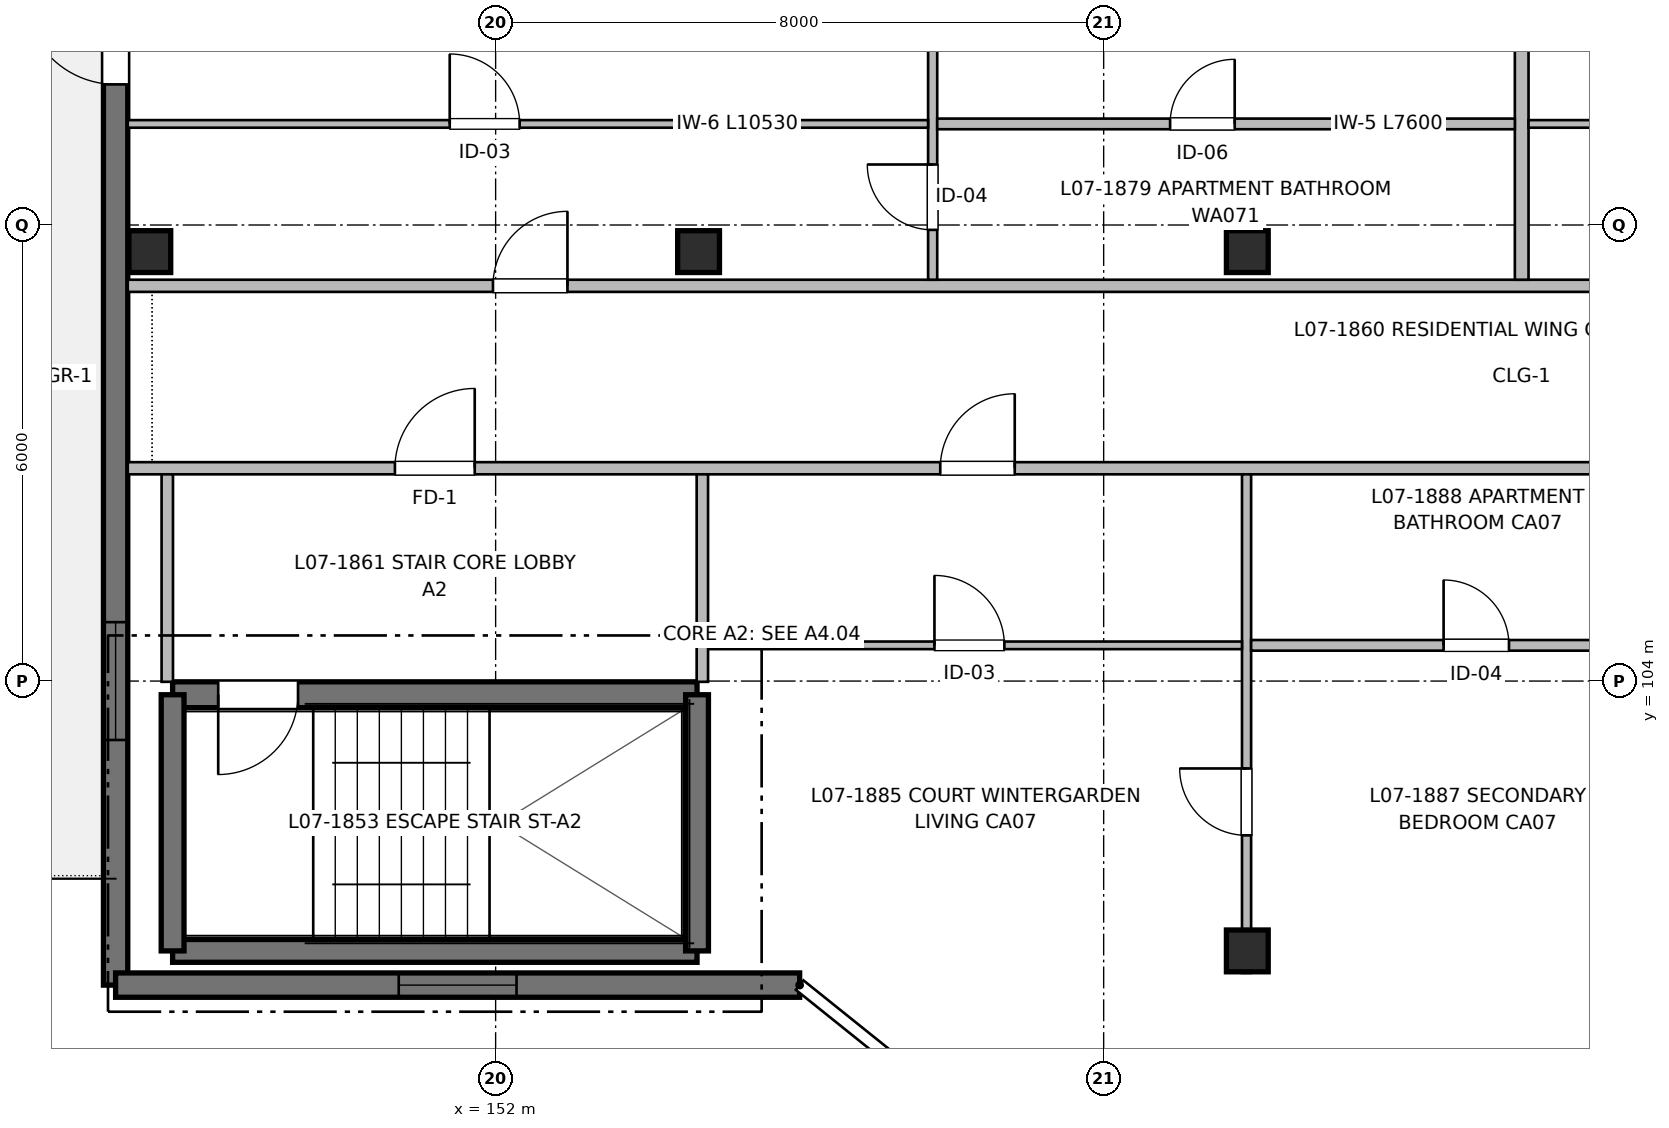
"""IFC4 building model, lengths in metres.
Left out: names, types, materials, properties, quantities, classifications, styles, units other than length and angle.
Written with IfcOpenShell. Run it as: python <this file> out.ifc"""

import sys

from ifc_helpers import new_model, si_unit, direction, frame, frame_2d, origin, origin_2d, place, context, subcontext, project, spatial, rectangle, extrude, element, fill, save


model = new_model("IFC4")
c1 = context("Model", 3, precision=1e-05, world=origin(), true_north=direction((0.0, 1.0)))
c2 = subcontext(c1, "Body", "Model", "MODEL_VIEW")
j1 = project(units=[si_unit("LENGTHUNIT", "METRE"), si_unit("PLANEANGLEUNIT", "RADIAN")], contexts=[c1])
p1 = place(None, origin())
s1 = spatial("IfcSite", under=j1, at=p1, CompositionType="ELEMENT")
p2 = place(p1, origin())
s2 = spatial("IfcBuilding", under=s1, at=p2, CompositionType="ELEMENT")
p3 = place(p2, frame((0.0, 0.0, 23.36)))
s3 = spatial("IfcBuildingStorey", under=s2, at=p3, CompositionType="ELEMENT", Elevation=23.36)
for number, where, z_axis, x_axis in (
    (1, (147.45, 109.65, 0.0), (0.0, 0.0, 1.0), (1.0, 0.0, 0.0)),
    (2, (154.67, 109.65, 0.0), (0.0, 0.0, 1.0), (1.0, 0.0, 0.0)),
    (3, (161.89, 100.45, 0.0), (0.0, 0.0, 1.0), (1.0, 0.0, 0.0)),
    (4, (161.89, 109.65, 0.0), (0.0, 0.0, 1.0), (1.0, 0.0, 0.0)),
):
    element("IfcColumn", number, at=place(p3, frame(where, z_axis=z_axis, x_axis=x_axis)), inside=s3, PredefinedType="COLUMN", context=c2, shape_type="SweptSolid", body=[
        extrude(rectangle(XDim=0.55, YDim=0.55, at=origin_2d()), origin(), (0.0, 0.0, 1.0), 3.2),
    ])
p4 = place(p3, frame((147.75, 100.45, 0.0), z_axis=(0.0, 0.0, 1.0), x_axis=(1.0, 0.0, 0.0)))
e5 = element("IfcWall", 5, at=p4, inside=s3, PredefinedType="SHEAR", context=c2, shape_type="SweptSolid", body=[
    extrude(rectangle(XDim=6.9, YDim=0.3, at=frame_2d((3.45, 0.0))), origin(), (0.0, 0.0, 1.0), 3.2),
])
p5 = place(p3, frame((154.65, 103.82, 0.0), z_axis=(0.0, 0.0, 1.0), x_axis=(-1.0, 0.0, 0.0)))
e6 = element("IfcWall", 6, at=p5, inside=s3, PredefinedType="SHEAR", context=c2, shape_type="SweptSolid", body=[
    extrude(rectangle(XDim=6.9, YDim=0.34, at=frame_2d((3.45, 0.0))), origin(), (0.0, 0.0, 1.0), 3.2),
])
p6 = place(p5, frame((5.25, 0.0, 0.0)))
e7 = element("IfcOpeningElement", 7, at=p6, cuts=e6, PredefinedType="OPENING", context=c2, shape_type="SweptSolid", body=[
    extrude(rectangle(XDim=1.05, YDim=2.15, at=frame_2d((0.525, 1.075))), frame((0.0, 0.18, 0.0), z_axis=(0.0, -1.0, 0.0), x_axis=(1.0, 0.0, 0.0)), (0.0, 0.0, 1.0), 0.36),
])
for number, where, z_axis, x_axis in (
    (8, (147.75, 103.82, 0.0), (0.0, 0.0, 1.0), (0.0, -1.0, 0.0)),
    (9, (154.65, 100.45, 0.0), (0.0, 0.0, 1.0), (0.0, 1.0, 0.0)),
):
    element("IfcWall", number, at=place(p3, frame(where, z_axis=z_axis, x_axis=x_axis)), inside=s3, PredefinedType="SHEAR", context=c2, shape_type="SweptSolid", body=[
        extrude(rectangle(XDim=3.37, YDim=0.3, at=frame_2d((1.685, 0.0))), origin(), (0.0, 0.0, 1.0), 3.2),
    ])
p7 = place(p3, frame((147.0, 100.0, 0.0), z_axis=(0.0, 0.0, 1.0), x_axis=(0.0, 1.0, 0.0)))
e10 = element("IfcWall", 10, at=p7, inside=s3, PredefinedType="SHEAR", context=c2, shape_type="SweptSolid", body=[
    extrude(rectangle(XDim=16.0, YDim=0.32, at=frame_2d((8.0, 0.0))), origin(), (0.0, 0.0, 1.0), 2.98),
])
p8 = place(p7, frame((3.225, 0.0, 0.82)))
e11 = element("IfcOpeningElement", 11, at=p8, cuts=e10, PredefinedType="OPENING", context=c2, shape_type="SweptSolid", body=[
    extrude(rectangle(XDim=1.55, YDim=1.4, at=frame_2d((0.775, 0.7))), frame((0.0, 0.17, 0.0), z_axis=(0.0, -1.0, 0.0), x_axis=(1.0, 0.0, 0.0)), (0.0, 0.0, 1.0), 0.34),
])
p9 = place(p7, frame((11.85, 0.0, 0.0)))
e12 = element("IfcOpeningElement", 12, at=p9, cuts=e10, PredefinedType="OPENING", context=c2, shape_type="SweptSolid", body=[
    extrude(rectangle(XDim=1.2, YDim=2.2, at=frame_2d((0.6, 1.1))), frame((0.0, 0.17, 0.0), z_axis=(0.0, -1.0, 0.0), x_axis=(1.0, 0.0, 0.0)), (0.0, 0.0, 1.0), 0.34),
])
p10 = place(p3, frame((156.0, 100.0, 0.0), z_axis=(0.0, 0.0, 1.0), x_axis=(-1.0, 0.0, 0.0)))
e13 = element("IfcWall", 13, at=p10, inside=s3, PredefinedType="SHEAR", context=c2, shape_type="SweptSolid", body=[
    extrude(rectangle(XDim=9.0, YDim=0.32, at=frame_2d((4.5, 0.0))), origin(), (0.0, 0.0, 1.0), 2.98),
])
p11 = place(p10, frame((3.725, 0.0, 0.82)))
e14 = element("IfcOpeningElement", 14, at=p11, cuts=e13, PredefinedType="OPENING", context=c2, shape_type="SweptSolid", body=[
    extrude(rectangle(XDim=1.55, YDim=1.4, at=frame_2d((0.775, 0.7))), frame((0.0, 0.17, 0.0), z_axis=(0.0, -1.0, 0.0), x_axis=(1.0, 0.0, 0.0)), (0.0, 0.0, 1.0), 0.34),
])
p12 = place(p3, frame((147.16, 106.8, 0.0), z_axis=(0.0, 0.0, 1.0), x_axis=(1.0, 0.0, 0.0)))
e15 = element("IfcWall", 15, at=p12, inside=s3, PredefinedType="PARTITIONING", context=c2, shape_type="SweptSolid", body=[
    extrude(rectangle(XDim=27.64, YDim=0.16, at=frame_2d((13.82, 0.0))), origin(), (0.0, 0.0, 1.0), 2.935),
])
p13 = place(p12, frame((3.515, 0.0, 0.0)))
e16 = element("IfcOpeningElement", 16, at=p13, cuts=e15, PredefinedType="OPENING", context=c2, shape_type="SweptSolid", body=[
    extrude(rectangle(XDim=1.05, YDim=2.15, at=frame_2d((0.525, 1.075))), frame((0.0, 0.09, 0.0), z_axis=(0.0, -1.0, 0.0), x_axis=(1.0, 0.0, 0.0)), (0.0, 0.0, 1.0), 0.18),
])
p14 = place(p12, frame((10.69, 0.0, 0.0)))
e17 = element("IfcOpeningElement", 17, at=p14, cuts=e15, PredefinedType="OPENING", context=c2, shape_type="SweptSolid", body=[
    extrude(rectangle(XDim=0.98, YDim=2.15, at=frame_2d((0.49, 1.075))), frame((0.0, 0.09, 0.0), z_axis=(0.0, -1.0, 0.0), x_axis=(1.0, 0.0, 0.0)), (0.0, 0.0, 1.0), 0.18),
])
p15 = place(p3, frame((147.16, 109.2, 0.0), z_axis=(0.0, 0.0, 1.0), x_axis=(1.0, 0.0, 0.0)))
e18 = element("IfcWall", 18, at=p15, inside=s3, PredefinedType="PARTITIONING", context=c2, shape_type="SweptSolid", body=[
    extrude(rectangle(XDim=36.68, YDim=0.16, at=frame_2d((18.34, 0.0))), origin(), (0.0, 0.0, 1.0), 2.935),
])
p16 = place(p15, frame((4.805, 0.0, 0.0)))
e19 = element("IfcOpeningElement", 19, at=p16, cuts=e18, PredefinedType="OPENING", context=c2, shape_type="SweptSolid", body=[
    extrude(rectangle(XDim=0.98, YDim=2.15, at=frame_2d((0.49, 1.075))), frame((0.0, 0.09, 0.0), z_axis=(0.0, -1.0, 0.0), x_axis=(1.0, 0.0, 0.0)), (0.0, 0.0, 1.0), 0.18),
])
p17 = place(p15, frame((23.235, 0.0, 0.0)))
e20 = element("IfcOpeningElement", 20, at=p17, cuts=e18, PredefinedType="OPENING", context=c2, shape_type="SweptSolid", body=[
    extrude(rectangle(XDim=0.98, YDim=2.15, at=frame_2d((0.49, 1.075))), frame((0.0, 0.09, 0.0), z_axis=(0.0, -1.0, 0.0), x_axis=(1.0, 0.0, 0.0)), (0.0, 0.0, 1.0), 0.18),
])
for number, where, z_axis, x_axis in (
    (21, (147.68, 103.99, 0.0), (0.0, 0.0, 1.0), (0.0, 1.0, 0.0)),
    (22, (154.72, 103.99, 0.0), (0.0, 0.0, 1.0), (0.0, 1.0, 0.0)),
):
    element("IfcWall", number, at=place(p3, frame(where, z_axis=z_axis, x_axis=x_axis)), inside=s3, PredefinedType="PARTITIONING", context=c2, shape_type="SweptSolid", body=[
        extrude(rectangle(XDim=2.73, YDim=0.15, at=frame_2d((1.365, 0.0))), origin(), (0.0, 0.0, 1.0), 2.935),
    ])
p18 = place(p3, frame((165.5, 109.28, 0.0), z_axis=(0.0, 0.0, 1.0), x_axis=(0.0, 1.0, 0.0)))
e23 = element("IfcWall", 23, at=p18, inside=s3, PredefinedType="PARTITIONING", context=c2, shape_type="SweptSolid", body=[
    extrude(rectangle(XDim=6.59, YDim=0.18, at=frame_2d((3.295, 0.0))), origin(), (0.0, 0.0, 1.0), 2.935),
])
p19 = place(p3, frame((157.75, 109.28, 0.0), z_axis=(0.0, 0.0, 1.0), x_axis=(0.0, 1.0, 0.0)))
e24 = element("IfcWall", 24, at=p19, inside=s3, PredefinedType="PARTITIONING", context=c2, shape_type="SweptSolid", body=[
    extrude(rectangle(XDim=6.59, YDim=0.12, at=frame_2d((3.295, 0.0))), origin(), (0.0, 0.0, 1.0), 2.935),
])
p20 = place(p19, frame((0.656, 0.0, 0.0)))
e25 = element("IfcOpeningElement", 25, at=p20, cuts=e24, PredefinedType="OPENING", context=c2, shape_type="SweptSolid", body=[
    extrude(rectangle(XDim=0.86, YDim=2.1, at=frame_2d((0.43, 1.05))), frame((0.0, 0.07, 0.0), z_axis=(0.0, -1.0, 0.0), x_axis=(1.0, 0.0, 0.0)), (0.0, 0.0, 1.0), 0.14),
])
p21 = place(p19, frame((4.093, 0.0, 0.0)))
e26 = element("IfcOpeningElement", 26, at=p21, cuts=e24, PredefinedType="OPENING", context=c2, shape_type="SweptSolid", body=[
    extrude(rectangle(XDim=0.9, YDim=2.1, at=frame_2d((0.45, 1.05))), frame((0.0, 0.07, 0.0), z_axis=(0.0, -1.0, 0.0), x_axis=(1.0, 0.0, 0.0)), (0.0, 0.0, 1.0), 0.14),
])
p22 = place(p3, frame((157.81, 111.33, 0.0), z_axis=(0.0, 0.0, 1.0), x_axis=(1.0, 0.0, 0.0)))
e27 = element("IfcWall", 27, at=p22, inside=s3, PredefinedType="PARTITIONING", context=c2, shape_type="SweptSolid", body=[
    extrude(rectangle(XDim=7.6, YDim=0.14, at=frame_2d((3.8, 0.0))), origin(), (0.0, 0.0, 1.0), 2.935),
])
p23 = place(p22, frame((3.064, 0.0, 0.0)))
e28 = element("IfcOpeningElement", 28, at=p23, cuts=e27, PredefinedType="OPENING", context=c2, shape_type="SweptSolid", body=[
    extrude(rectangle(XDim=0.85, YDim=2.05, at=frame_2d((0.425, 1.025))), frame((0.0, 0.08, 0.0), z_axis=(0.0, -1.0, 0.0), x_axis=(1.0, 0.0, 0.0)), (0.0, 0.0, 1.0), 0.16),
])
p24 = place(p3, frame((147.16, 111.33, 0.0), z_axis=(0.0, 0.0, 1.0), x_axis=(1.0, 0.0, 0.0)))
e29 = element("IfcWall", 29, at=p24, inside=s3, PredefinedType="PARTITIONING", context=c2, shape_type="SweptSolid", body=[
    extrude(rectangle(XDim=10.53, YDim=0.1, at=frame_2d((5.265, 0.0))), origin(), (0.0, 0.0, 1.0), 2.935),
])
p25 = place(p24, frame((4.236, 0.0, 0.0)))
e30 = element("IfcOpeningElement", 30, at=p25, cuts=e29, PredefinedType="OPENING", context=c2, shape_type="SweptSolid", body=[
    extrude(rectangle(XDim=0.92, YDim=2.1, at=frame_2d((0.46, 1.05))), frame((0.0, 0.06, 0.0), z_axis=(0.0, -1.0, 0.0), x_axis=(1.0, 0.0, 0.0)), (0.0, 0.0, 1.0), 0.12),
])
p26 = place(p3, frame((165.59, 111.33, 0.0), z_axis=(0.0, 0.0, 1.0), x_axis=(1.0, 0.0, 0.0)))
e31 = element("IfcWall", 31, at=p26, inside=s3, PredefinedType="PARTITIONING", context=c2, shape_type="SweptSolid", body=[
    extrude(rectangle(XDim=10.53, YDim=0.1, at=frame_2d((5.265, 0.0))), origin(), (0.0, 0.0, 1.0), 2.935),
])
p27 = place(p26, frame((4.236, 0.0, 0.0)))
e32 = element("IfcOpeningElement", 32, at=p27, cuts=e31, PredefinedType="OPENING", context=c2, shape_type="SweptSolid", body=[
    extrude(rectangle(XDim=0.92, YDim=2.1, at=frame_2d((0.46, 1.05))), frame((0.0, 0.06, 0.0), z_axis=(0.0, -1.0, 0.0), x_axis=(1.0, 0.0, 0.0)), (0.0, 0.0, 1.0), 0.12),
])
p28 = place(p3, frame((161.88, 100.16, 0.0), z_axis=(0.0, 0.0, 1.0), x_axis=(0.0, 1.0, 0.0)))
e33 = element("IfcWall", 33, at=p28, inside=s3, PredefinedType="PARTITIONING", context=c2, shape_type="SweptSolid", body=[
    extrude(rectangle(XDim=6.56, YDim=0.12, at=frame_2d((3.28, 0.0))), origin(), (0.0, 0.0, 1.0), 2.68),
])
p29 = place(p28, frame((1.81, 0.0, 0.0)))
e34 = element("IfcOpeningElement", 34, at=p29, cuts=e33, PredefinedType="OPENING", context=c2, shape_type="SweptSolid", body=[
    extrude(rectangle(XDim=0.88, YDim=2.1, at=frame_2d((0.44, 1.05))), frame((0.0, 0.07, 0.0), z_axis=(0.0, -1.0, 0.0), x_axis=(1.0, 0.0, 0.0)), (0.0, 0.0, 1.0), 0.14),
])
p30 = place(p3, frame((161.94, 104.47, 0.0), z_axis=(0.0, 0.0, 1.0), x_axis=(1.0, 0.0, 0.0)))
e35 = element("IfcWall", 35, at=p30, inside=s3, PredefinedType="PARTITIONING", context=c2, shape_type="SweptSolid", body=[
    extrude(rectangle(XDim=5.97, YDim=0.14, at=frame_2d((2.985, 0.0))), origin(), (0.0, 0.0, 1.0), 2.935),
])
p31 = place(p30, frame((2.533, 0.0, 0.0)))
e36 = element("IfcOpeningElement", 36, at=p31, cuts=e35, PredefinedType="OPENING", context=c2, shape_type="SweptSolid", body=[
    extrude(rectangle(XDim=0.86, YDim=2.1, at=frame_2d((0.43, 1.05))), frame((0.0, 0.08, 0.0), z_axis=(0.0, -1.0, 0.0), x_axis=(1.0, 0.0, 0.0)), (0.0, 0.0, 1.0), 0.16),
])
p32 = place(p3, frame((154.8, 104.47, 0.0), z_axis=(0.0, 0.0, 1.0), x_axis=(1.0, 0.0, 0.0)))
e37 = element("IfcWall", 37, at=p32, inside=s3, PredefinedType="PARTITIONING", context=c2, shape_type="SweptSolid", body=[
    extrude(rectangle(XDim=7.02, YDim=0.1, at=frame_2d((3.51, 0.0))), origin(), (0.0, 0.0, 1.0), 2.935),
])
p33 = place(p32, frame((2.974, 0.0, 0.0)))
e38 = element("IfcOpeningElement", 38, at=p33, cuts=e37, PredefinedType="OPENING", context=c2, shape_type="SweptSolid", body=[
    extrude(rectangle(XDim=0.92, YDim=2.1, at=frame_2d((0.46, 1.05))), frame((0.0, 0.06, 0.0), z_axis=(0.0, -1.0, 0.0), x_axis=(1.0, 0.0, 0.0)), (0.0, 0.0, 1.0), 0.12),
])
p34 = place(p6, origin())
e39 = element("IfcDoor", 39, at=p34, inside=s3, OperationType="SINGLE_SWING_RIGHT", PredefinedType="DOOR", context=c2, shape_type="SweptSolid", body=[
    extrude(rectangle(XDim=1.05, YDim=2.15, at=frame_2d((0.525, 1.075))), frame((0.0, 0.025, 0.0), z_axis=(0.0, -1.0, 0.0), x_axis=(1.0, 0.0, 0.0)), (0.0, 0.0, 1.0), 0.05),
])
fill(e7, e39)
p35 = place(p8, origin())
e40 = element("IfcWindow", 40, at=p35, inside=s3, PartitioningType="SINGLE_PANEL", PredefinedType="WINDOW", context=c2, shape_type="SweptSolid", body=[
    extrude(rectangle(XDim=1.55, YDim=1.4, at=frame_2d((0.775, 0.7))), frame((0.0, 0.03, 0.0), z_axis=(0.0, -1.0, 0.0), x_axis=(1.0, 0.0, 0.0)), (0.0, 0.0, 1.0), 0.06),
])
fill(e11, e40)
p36 = place(p9, origin())
e41 = element("IfcDoor", 41, at=p36, inside=s3, OperationType="SINGLE_SWING_RIGHT", PredefinedType="DOOR", context=c2, shape_type="SweptSolid", body=[
    extrude(rectangle(XDim=1.2, YDim=2.2, at=frame_2d((0.6, 1.1))), frame((0.0, 0.025, 0.0), z_axis=(0.0, -1.0, 0.0), x_axis=(1.0, 0.0, 0.0)), (0.0, 0.0, 1.0), 0.05),
])
fill(e12, e41)
p37 = place(p11, origin())
e42 = element("IfcWindow", 42, at=p37, inside=s3, PartitioningType="SINGLE_PANEL", PredefinedType="WINDOW", context=c2, shape_type="SweptSolid", body=[
    extrude(rectangle(XDim=1.55, YDim=1.4, at=frame_2d((0.775, 0.7))), frame((0.0, 0.03, 0.0), z_axis=(0.0, -1.0, 0.0), x_axis=(1.0, 0.0, 0.0)), (0.0, 0.0, 1.0), 0.06),
])
fill(e14, e42)
p38 = place(p13, origin())
e43 = element("IfcDoor", 43, at=p38, inside=s3, OperationType="SINGLE_SWING_RIGHT", PredefinedType="DOOR", context=c2, shape_type="SweptSolid", body=[
    extrude(rectangle(XDim=1.05, YDim=2.15, at=frame_2d((0.525, 1.075))), frame((0.0, 0.025, 0.0), z_axis=(0.0, -1.0, 0.0), x_axis=(1.0, 0.0, 0.0)), (0.0, 0.0, 1.0), 0.05),
])
fill(e16, e43)
p39 = place(p16, origin())
e44 = element("IfcDoor", 44, at=p39, inside=s3, OperationType="SINGLE_SWING_RIGHT", PredefinedType="DOOR", context=c2, shape_type="SweptSolid", body=[
    extrude(rectangle(XDim=0.98, YDim=2.15, at=frame_2d((0.49, 1.075))), frame((0.0, 0.025, 0.0), z_axis=(0.0, -1.0, 0.0), x_axis=(1.0, 0.0, 0.0)), (0.0, 0.0, 1.0), 0.05),
])
fill(e19, e44)
p40 = place(p25, origin())
e45 = element("IfcDoor", 45, at=p40, inside=s3, OperationType="SINGLE_SWING_LEFT", PredefinedType="DOOR", context=c2, shape_type="SweptSolid", body=[
    extrude(rectangle(XDim=0.92, YDim=2.1, at=frame_2d((0.46, 1.05))), frame((0.0, 0.025, 0.0), z_axis=(0.0, -1.0, 0.0), x_axis=(1.0, 0.0, 0.0)), (0.0, 0.0, 1.0), 0.05),
])
fill(e30, e45)
p41 = place(p20, origin())
e46 = element("IfcDoor", 46, at=p41, inside=s3, OperationType="SINGLE_SWING_RIGHT", PredefinedType="DOOR", context=c2, shape_type="SweptSolid", body=[
    extrude(rectangle(XDim=0.86, YDim=2.1, at=frame_2d((0.43, 1.05))), frame((0.0, 0.025, 0.0), z_axis=(0.0, -1.0, 0.0), x_axis=(1.0, 0.0, 0.0)), (0.0, 0.0, 1.0), 0.05),
])
fill(e25, e46)
p42 = place(p23, origin())
e47 = element("IfcDoor", 47, at=p42, inside=s3, OperationType="SINGLE_SWING_RIGHT", PredefinedType="DOOR", context=c2, shape_type="SweptSolid", body=[
    extrude(rectangle(XDim=0.85, YDim=2.05, at=frame_2d((0.425, 1.025))), frame((0.0, 0.025, 0.0), z_axis=(0.0, -1.0, 0.0), x_axis=(1.0, 0.0, 0.0)), (0.0, 0.0, 1.0), 0.05),
])
fill(e28, e47)
p43 = place(p14, origin())
e48 = element("IfcDoor", 48, at=p43, inside=s3, OperationType="SINGLE_SWING_RIGHT", PredefinedType="DOOR", context=c2, shape_type="SweptSolid", body=[
    extrude(rectangle(XDim=0.98, YDim=2.15, at=frame_2d((0.49, 1.075))), frame((0.0, 0.025, 0.0), z_axis=(0.0, -1.0, 0.0), x_axis=(1.0, 0.0, 0.0)), (0.0, 0.0, 1.0), 0.05),
])
fill(e17, e48)
p44 = place(p33, origin())
e49 = element("IfcDoor", 49, at=p44, inside=s3, OperationType="SINGLE_SWING_LEFT", PredefinedType="DOOR", context=c2, shape_type="SweptSolid", body=[
    extrude(rectangle(XDim=0.92, YDim=2.1, at=frame_2d((0.46, 1.05))), frame((0.0, 0.025, 0.0), z_axis=(0.0, -1.0, 0.0), x_axis=(1.0, 0.0, 0.0)), (0.0, 0.0, 1.0), 0.05),
])
fill(e38, e49)
p45 = place(p29, origin())
e50 = element("IfcDoor", 50, at=p45, inside=s3, OperationType="SINGLE_SWING_RIGHT", PredefinedType="DOOR", context=c2, shape_type="SweptSolid", body=[
    extrude(rectangle(XDim=0.88, YDim=2.1, at=frame_2d((0.44, 1.05))), frame((0.0, 0.025, 0.0), z_axis=(0.0, -1.0, 0.0), x_axis=(1.0, 0.0, 0.0)), (0.0, 0.0, 1.0), 0.05),
])
fill(e34, e50)
p46 = place(p31, origin())
e51 = element("IfcDoor", 51, at=p46, inside=s3, OperationType="SINGLE_SWING_LEFT", PredefinedType="DOOR", context=c2, shape_type="SweptSolid", body=[
    extrude(rectangle(XDim=0.86, YDim=2.1, at=frame_2d((0.43, 1.05))), frame((0.0, 0.025, 0.0), z_axis=(0.0, -1.0, 0.0), x_axis=(1.0, 0.0, 0.0)), (0.0, 0.0, 1.0), 0.05),
])
fill(e36, e51)
save(model, sys.argv[1])
